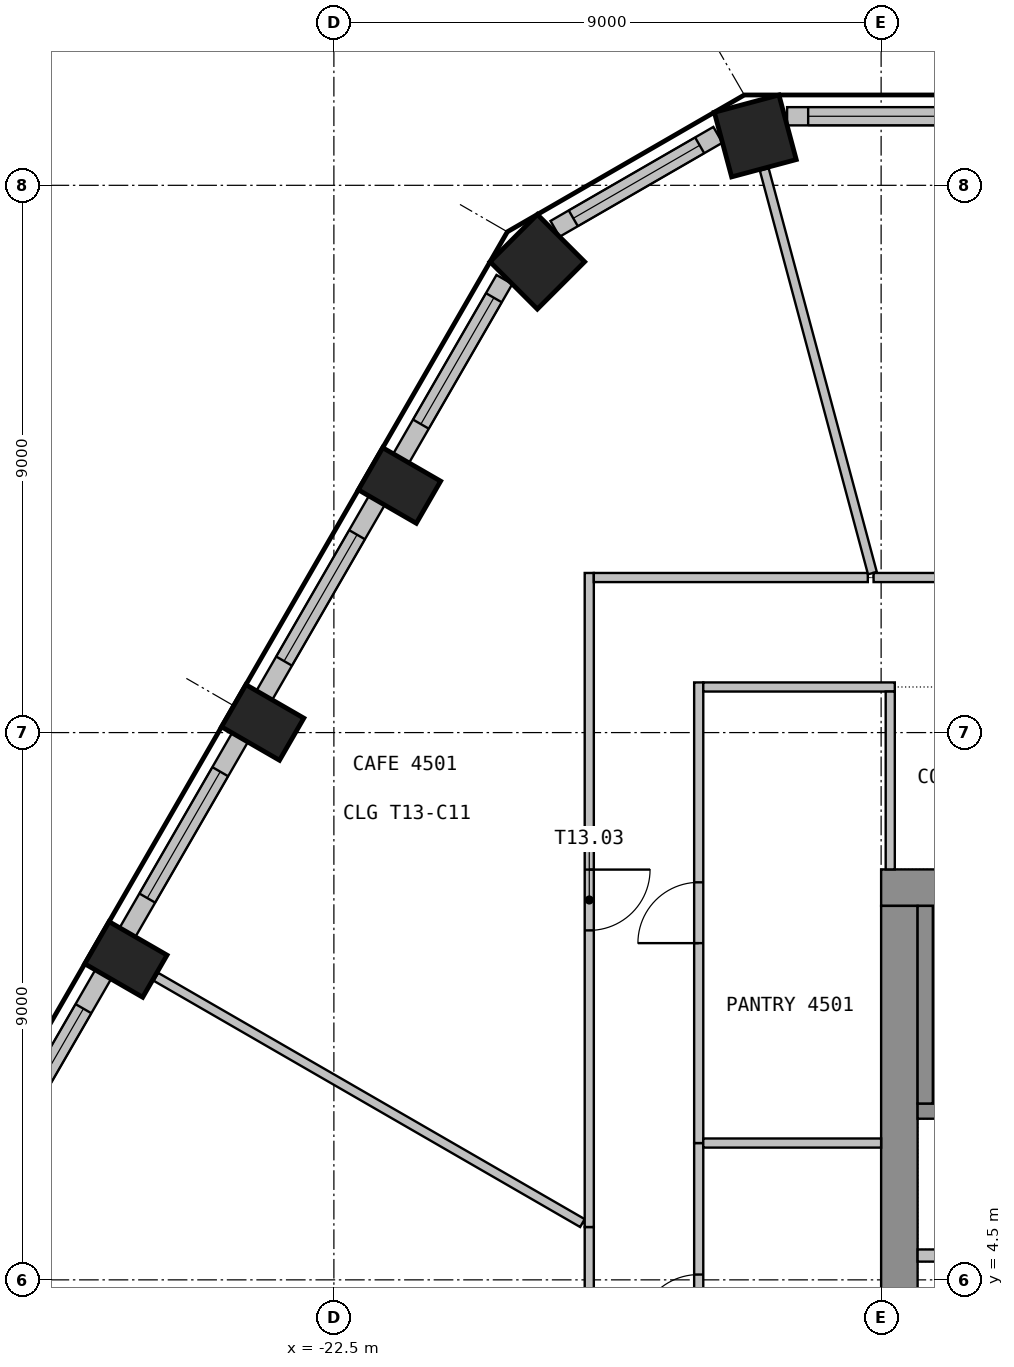
"""IFC4 building model, lengths in metres.
Left out: names, types, materials, properties, quantities, classifications, styles, units other than length and angle.
Written with IfcOpenShell. Run it as: python <this file> out.ifc"""

import sys

from ifc_helpers import new_model, si_unit, direction, frame, frame_2d, origin, origin_2d, place, context, subcontext, project, spatial, rectangle, extrude, element, fill, save


model = new_model("IFC4")
c1 = context("Model", 3, precision=1e-05, world=origin(), true_north=direction((0.0, 1.0)))
c2 = subcontext(c1, "Body", "Model", "MODEL_VIEW")
j1 = project(units=[si_unit("LENGTHUNIT", "METRE"), si_unit("PLANEANGLEUNIT", "RADIAN")], contexts=[c1])
p1 = place(None, origin())
s1 = spatial("IfcSite", under=j1, at=p1, CompositionType="ELEMENT")
p2 = place(p1, origin())
s2 = spatial("IfcBuilding", under=s1, at=p2, CompositionType="ELEMENT")
p3 = place(p2, frame((0.0, 0.0, 183.9)))
s3 = spatial("IfcBuildingStorey", under=s2, at=p3, CompositionType="ELEMENT", Elevation=183.9)
for number, where, z_axis, x_axis in (
    (1, (-15.57, 23.312, 0.0), (0.0, 0.0, 1.0), (-0.966, -0.259, 0.0)),
    (2, (-19.154, 21.242, 0.0), (0.0, 0.0, 1.0), (-0.707, -0.707, 0.0)),
):
    element("IfcColumn", number, at=place(p3, frame(where, z_axis=z_axis, x_axis=x_axis)), inside=s3, PredefinedType="COLUMN", context=c2, shape_type="SweptSolid", body=[
        extrude(rectangle(XDim=1.1, YDim=1.1, at=origin_2d()), origin(), (0.0, 0.0, 1.0), 3.55),
    ])
for number, where, z_axis, x_axis in (
    (3, (-21.421, 17.563, 0.0), (0.0, 0.0, 1.0), (-0.5, -0.866, 0.0)),
    (4, (-23.671, 13.666, 0.0), (0.0, 0.0, 1.0), (-0.5, -0.866, 0.0)),
    (5, (-25.921, 9.769, 0.0), (0.0, 0.0, 1.0), (-0.5, -0.866, 0.0)),
):
    element("IfcColumn", number, at=place(p3, frame(where, z_axis=z_axis, x_axis=x_axis)), inside=s3, PredefinedType="COLUMN", context=c2, shape_type="SweptSolid", body=[
        extrude(rectangle(XDim=0.8, YDim=1.1, at=origin_2d()), origin(), (0.0, 0.0, 1.0), 3.55),
    ])
p4 = place(p3, frame((-11.65, 23.635, 0.0), z_axis=(0.0, 0.0, 1.0), x_axis=(-1.0, 0.0, 0.0)))
e6 = element("IfcWall", 6, at=p4, inside=s3, PredefinedType="SOLIDWALL", context=c2, shape_type="SweptSolid", body=[
    extrude(rectangle(XDim=3.396, YDim=0.3, at=frame_2d((1.698, 0.0))), origin(), (0.0, 0.0, 1.0), 3.55),
])
p5 = place(p4, frame((0.649, 0.0, 0.9)))
e7 = element("IfcOpeningElement", 7, at=p5, cuts=e6, PredefinedType="OPENING", context=c2, shape_type="SweptSolid", body=[
    extrude(rectangle(XDim=2.4, YDim=2.1, at=frame_2d((1.2, 1.05))), frame((0.0, 0.16, 0.0), z_axis=(0.0, -1.0, 0.0), x_axis=(1.0, 0.0, 0.0)), (0.0, 0.0, 1.0), 0.32),
])
p6 = place(p3, frame((-16.184, 23.331, 0.0), z_axis=(0.0, 0.0, 1.0), x_axis=(-0.865994975416, -0.500052699777, 0.0)))
e8 = element("IfcWall", 8, at=p6, inside=s3, PredefinedType="SOLIDWALL", context=c2, shape_type="SweptSolid", body=[
    extrude(rectangle(XDim=3.093, YDim=0.3, at=frame_2d((1.546, 0.0))), origin(), (0.0, 0.0, 1.0), 3.55),
])
p7 = place(p6, frame((0.346, 0.0, 0.9)))
e9 = element("IfcOpeningElement", 9, at=p7, cuts=e8, PredefinedType="OPENING", context=c2, shape_type="SweptSolid", body=[
    extrude(rectangle(XDim=2.4, YDim=2.1, at=frame_2d((1.2, 1.05))), frame((0.0, 0.16, 0.0), z_axis=(0.0, -1.0, 0.0), x_axis=(1.0, 0.0, 0.0)), (0.0, 0.0, 1.0), 0.32),
])
p8 = place(p3, frame((-19.696, 20.951, 0.0), z_axis=(0.0, 0.0, 1.0), x_axis=(-0.500012868213, -0.866017974191, 0.0)))
e10 = element("IfcWall", 10, at=p8, inside=s3, PredefinedType="SOLIDWALL", context=c2, shape_type="SweptSolid", body=[
    extrude(rectangle(XDim=3.396, YDim=0.3, at=frame_2d((1.698, 0.0))), origin(), (0.0, 0.0, 1.0), 3.55),
])
p9 = place(p8, frame((0.346, 0.0, 0.9)))
e11 = element("IfcOpeningElement", 11, at=p9, cuts=e10, PredefinedType="OPENING", context=c2, shape_type="SweptSolid", body=[
    extrude(rectangle(XDim=2.4, YDim=2.1, at=frame_2d((1.2, 1.05))), frame((0.0, 0.16, 0.0), z_axis=(0.0, -1.0, 0.0), x_axis=(1.0, 0.0, 0.0)), (0.0, 0.0, 1.0), 0.32),
])
p10 = place(p3, frame((-21.794, 17.317, 0.0), z_axis=(0.0, 0.0, 1.0), x_axis=(-0.500029062817, -0.866008623709, 0.0)))
e12 = element("IfcWall", 12, at=p10, inside=s3, PredefinedType="SOLIDWALL", context=c2, shape_type="SweptSolid", body=[
    extrude(rectangle(XDim=3.699, YDim=0.3, at=frame_2d((1.85, 0.0))), origin(), (0.0, 0.0, 1.0), 3.55),
])
p11 = place(p10, frame((0.649, 0.0, 0.9)))
e13 = element("IfcOpeningElement", 13, at=p11, cuts=e12, PredefinedType="OPENING", context=c2, shape_type="SweptSolid", body=[
    extrude(rectangle(XDim=2.4, YDim=2.1, at=frame_2d((1.2, 1.05))), frame((0.0, 0.16, 0.0), z_axis=(0.0, -1.0, 0.0), x_axis=(1.0, 0.0, 0.0)), (0.0, 0.0, 1.0), 0.32),
])
p12 = place(p3, frame((-24.044, 13.419, 0.0), z_axis=(0.0, 0.0, 1.0), x_axis=(-0.500029062817, -0.866008623709, 0.0)))
e14 = element("IfcWall", 14, at=p12, inside=s3, PredefinedType="SOLIDWALL", context=c2, shape_type="SweptSolid", body=[
    extrude(rectangle(XDim=3.699, YDim=0.3, at=frame_2d((1.85, 0.0))), origin(), (0.0, 0.0, 1.0), 3.55),
])
p13 = place(p12, frame((0.649, 0.0, 0.9)))
e15 = element("IfcOpeningElement", 15, at=p13, cuts=e14, PredefinedType="OPENING", context=c2, shape_type="SweptSolid", body=[
    extrude(rectangle(XDim=2.4, YDim=2.1, at=frame_2d((1.2, 1.05))), frame((0.0, 0.16, 0.0), z_axis=(0.0, -1.0, 0.0), x_axis=(1.0, 0.0, 0.0)), (0.0, 0.0, 1.0), 0.32),
])
p14 = place(p3, frame((-26.294, 9.522, 0.0), z_axis=(0.0, 0.0, 1.0), x_axis=(-0.500029062817, -0.866008623709, 0.0)))
e16 = element("IfcWall", 16, at=p14, inside=s3, PredefinedType="SOLIDWALL", context=c2, shape_type="SweptSolid", body=[
    extrude(rectangle(XDim=3.699, YDim=0.3, at=frame_2d((1.85, 0.0))), origin(), (0.0, 0.0, 1.0), 3.55),
])
p15 = place(p14, frame((0.649, 0.0, 0.9)))
e17 = element("IfcOpeningElement", 17, at=p15, cuts=e16, PredefinedType="OPENING", context=c2, shape_type="SweptSolid", body=[
    extrude(rectangle(XDim=2.4, YDim=2.1, at=frame_2d((1.2, 1.05))), frame((0.0, 0.16, 0.0), z_axis=(0.0, -1.0, 0.0), x_axis=(1.0, 0.0, 0.0)), (0.0, 0.0, 1.0), 0.32),
])
p16 = place(p3, frame((-13.5, 10.95, 0.0), z_axis=(0.0, 0.0, 1.0), x_axis=(1.0, 0.0, 0.0)))
e18 = element("IfcWall", 18, at=p16, inside=s3, PredefinedType="SHEAR", context=c2, shape_type="SweptSolid", body=[
    extrude(rectangle(XDim=27.0, YDim=0.6, at=frame_2d((13.5, 0.0))), origin(), (0.0, 0.0, 1.0), 3.55),
])
p17 = place(p16, frame((12.3, 0.0, 0.0)))
e19 = element("IfcOpeningElement", 19, at=p17, cuts=e18, PredefinedType="OPENING", context=c2, shape_type="SweptSolid", body=[
    extrude(rectangle(XDim=2.4, YDim=2.1, at=frame_2d((1.2, 1.05))), frame((0.0, 0.31, 0.0), z_axis=(0.0, -1.0, 0.0), x_axis=(1.0, 0.0, 0.0)), (0.0, 0.0, 1.0), 0.62),
])
p18 = place(p16, frame((1.05, 0.0, 0.0)))
e20 = element("IfcOpeningElement", 20, at=p18, cuts=e18, PredefinedType="OPENING", context=c2, shape_type="SweptSolid", body=[
    extrude(rectangle(XDim=1.2, YDim=2.1, at=frame_2d((0.6, 1.05))), frame((0.0, 0.31, 0.0), z_axis=(0.0, -1.0, 0.0), x_axis=(1.0, 0.0, 0.0)), (0.0, 0.0, 1.0), 0.62),
])
p19 = place(p16, frame((24.75, 0.0, 0.0)))
e21 = element("IfcOpeningElement", 21, at=p19, cuts=e18, PredefinedType="OPENING", context=c2, shape_type="SweptSolid", body=[
    extrude(rectangle(XDim=1.2, YDim=2.1, at=frame_2d((0.6, 1.05))), frame((0.0, 0.31, 0.0), z_axis=(0.0, -1.0, 0.0), x_axis=(1.0, 0.0, 0.0)), (0.0, 0.0, 1.0), 0.62),
])
p20 = place(p3, frame((-13.2, -10.65, 0.0), z_axis=(0.0, 0.0, 1.0), x_axis=(0.0, 1.0, 0.0)))
e22 = element("IfcWall", 22, at=p20, inside=s3, PredefinedType="SHEAR", context=c2, shape_type="SweptSolid", body=[
    extrude(rectangle(XDim=21.3, YDim=0.6, at=frame_2d((10.65, 0.0))), origin(), (0.0, 0.0, 1.0), 3.55),
])
p21 = place(p20, frame((9.45, 0.0, 0.0)))
e23 = element("IfcOpeningElement", 23, at=p21, cuts=e22, PredefinedType="OPENING", context=c2, shape_type="SweptSolid", body=[
    extrude(rectangle(XDim=2.4, YDim=2.1, at=frame_2d((1.2, 1.05))), frame((0.0, 0.31, 0.0), z_axis=(0.0, -1.0, 0.0), x_axis=(1.0, 0.0, 0.0)), (0.0, 0.0, 1.0), 0.62),
])
p22 = place(p3, frame((-12.9, 7.275, 0.0), z_axis=(0.0, 0.0, 1.0), x_axis=(1.0, 0.0, 0.0)))
e24 = element("IfcWall", 24, at=p22, inside=s3, PredefinedType="SHEAR", context=c2, shape_type="SweptSolid", body=[
    extrude(rectangle(XDim=10.1, YDim=0.25, at=frame_2d((5.05, 0.0))), origin(), (0.0, 0.0, 1.0), 3.55),
])
p23 = place(p22, frame((0.45, 0.0, 0.0)))
e25 = element("IfcOpeningElement", 25, at=p23, cuts=e24, PredefinedType="OPENING", context=c2, shape_type="SweptSolid", body=[
    extrude(rectangle(XDim=1.2, YDim=2.1, at=frame_2d((0.6, 1.05))), frame((0.0, 0.135, 0.0), z_axis=(0.0, -1.0, 0.0), x_axis=(1.0, 0.0, 0.0)), (0.0, 0.0, 1.0), 0.27),
])
p24 = place(p3, frame((-12.775, 7.4, 0.0), z_axis=(0.0, 0.0, 1.0), x_axis=(0.0, 1.0, 0.0)))
e26 = element("IfcWall", 26, at=p24, inside=s3, PredefinedType="SHEAR", context=c2, shape_type="SweptSolid", body=[
    extrude(rectangle(XDim=3.25, YDim=0.25, at=frame_2d((1.625, 0.0))), origin(), (0.0, 0.0, 1.0), 3.55),
])
p25 = place(p3, frame((-12.9, 4.9, 0.0), z_axis=(0.0, 0.0, 1.0), x_axis=(1.0, 0.0, 0.0)))
e27 = element("IfcWall", 27, at=p25, inside=s3, PredefinedType="PARTITIONING", context=c2, shape_type="SweptSolid", body=[
    extrude(rectangle(XDim=11.375, YDim=0.2, at=frame_2d((5.688, 0.0))), origin(), (0.0, 0.0, 1.0), 3.55),
])
p26 = place(p3, frame((-25.427, 9.484, 0.0), z_axis=(0.0, 0.0, 1.0), x_axis=(0.866017937352, -0.500012932018, 0.0)))
e28 = element("IfcWall", 28, at=p26, inside=s3, PredefinedType="PARTITIONING", context=c2, shape_type="SweptSolid", body=[
    extrude(rectangle(XDim=8.1, YDim=0.15, at=frame_2d((4.05, 0.0))), origin(), (0.0, 0.0, 1.0), 3.55),
])
p27 = place(p3, frame((-18.3, 5.369, 0.0), z_axis=(0.0, 0.0, 1.0), x_axis=(0.0, -1.0, 0.0)))
e29 = element("IfcWall", 29, at=p27, inside=s3, PredefinedType="PARTITIONING", context=c2, shape_type="SweptSolid", body=[
    extrude(rectangle(XDim=5.542, YDim=0.15, at=frame_2d((2.771, 0.0))), origin(), (0.0, 0.0, 1.0), 3.55),
])
p28 = place(p27, frame((2.271, 0.0, 0.0)))
e30 = element("IfcOpeningElement", 30, at=p28, cuts=e29, PredefinedType="OPENING", context=c2, shape_type="SweptSolid", body=[
    extrude(rectangle(XDim=1.0, YDim=2.1, at=frame_2d((0.5, 1.05))), frame((0.0, 0.085, 0.0), z_axis=(0.0, -1.0, 0.0), x_axis=(1.0, 0.0, 0.0)), (0.0, 0.0, 1.0), 0.17),
])
p29 = place(p3, frame((-18.3, 16.125, 0.0), z_axis=(0.0, 0.0, 1.0), x_axis=(0.0, -1.0, 0.0)))
e31 = element("IfcWall", 31, at=p29, inside=s3, PredefinedType="PARTITIONING", context=c2, shape_type="SweptSolid", body=[
    extrude(rectangle(XDim=10.756, YDim=0.15, at=frame_2d((5.378, 0.0))), origin(), (0.0, 0.0, 1.0), 3.55),
])
p30 = place(p29, frame((4.878, 0.0, 0.0)))
e32 = element("IfcOpeningElement", 32, at=p30, cuts=e31, PredefinedType="OPENING", context=c2, shape_type="SweptSolid", body=[
    extrude(rectangle(XDim=1.0, YDim=2.1, at=frame_2d((0.5, 1.05))), frame((0.0, 0.085, 0.0), z_axis=(0.0, -1.0, 0.0), x_axis=(1.0, 0.0, 0.0)), (0.0, 0.0, 1.0), 0.17),
])
p31 = place(p3, frame((-13.719, 16.05, 0.0), z_axis=(0.0, 0.0, 1.0), x_axis=(-1.0, 0.0, 0.0)))
e33 = element("IfcWall", 33, at=p31, inside=s3, PredefinedType="PARTITIONING", context=c2, shape_type="SweptSolid", body=[
    extrude(rectangle(XDim=4.506, YDim=0.15, at=frame_2d((2.253, 0.0))), origin(), (0.0, 0.0, 1.0), 3.55),
])
p32 = place(p3, frame((-16.5, 1.425, 0.0), z_axis=(0.0, 0.0, 1.0), x_axis=(0.0, 1.0, 0.0)))
e34 = element("IfcWall", 34, at=p32, inside=s3, PredefinedType="PARTITIONING", context=c2, shape_type="SweptSolid", body=[
    extrude(rectangle(XDim=5.325, YDim=0.15, at=frame_2d((2.663, 0.0))), origin(), (0.0, 0.0, 1.0), 3.55),
])
p33 = place(p32, frame((2.163, 0.0, 0.0)))
e35 = element("IfcOpeningElement", 35, at=p33, cuts=e34, PredefinedType="OPENING", context=c2, shape_type="SweptSolid", body=[
    extrude(rectangle(XDim=1.0, YDim=2.1, at=frame_2d((0.5, 1.05))), frame((0.0, 0.085, 0.0), z_axis=(0.0, -1.0, 0.0), x_axis=(1.0, 0.0, 0.0)), (0.0, 0.0, 1.0), 0.17),
])
p34 = place(p3, frame((-16.5, 6.75, 0.0), z_axis=(0.0, 0.0, 1.0), x_axis=(0.0, 1.0, 0.0)))
e36 = element("IfcWall", 36, at=p34, inside=s3, PredefinedType="PARTITIONING", context=c2, shape_type="SweptSolid", body=[
    extrude(rectangle(XDim=7.575, YDim=0.15, at=frame_2d((3.788, 0.0))), origin(), (0.0, 0.0, 1.0), 3.55),
])
p35 = place(p34, frame((3.288, 0.0, 0.0)))
e37 = element("IfcOpeningElement", 37, at=p35, cuts=e36, PredefinedType="OPENING", context=c2, shape_type="SweptSolid", body=[
    extrude(rectangle(XDim=1.0, YDim=2.1, at=frame_2d((0.5, 1.05))), frame((0.0, 0.085, 0.0), z_axis=(0.0, -1.0, 0.0), x_axis=(1.0, 0.0, 0.0)), (0.0, 0.0, 1.0), 0.17),
])
p36 = place(p3, frame((-16.425, 6.75, 0.0), z_axis=(0.0, 0.0, 1.0), x_axis=(1.0, 0.0, 0.0)))
e38 = element("IfcWall", 38, at=p36, inside=s3, PredefinedType="PARTITIONING", context=c2, shape_type="SweptSolid", body=[
    extrude(rectangle(XDim=2.925, YDim=0.15, at=frame_2d((1.462, 0.0))), origin(), (0.0, 0.0, 1.0), 3.55),
])
p37 = place(p3, frame((-16.425, 14.25, 0.0), z_axis=(0.0, 0.0, 1.0), x_axis=(1.0, 0.0, 0.0)))
e39 = element("IfcWall", 39, at=p37, inside=s3, PredefinedType="PARTITIONING", context=c2, shape_type="SweptSolid", body=[
    extrude(rectangle(XDim=3.15, YDim=0.15, at=frame_2d((1.575, 0.0))), origin(), (0.0, 0.0, 1.0), 3.55),
])
p38 = place(p3, frame((-15.422, 22.761, 0.0), z_axis=(0.0, 0.0, 1.0), x_axis=(0.258807697684, -0.965928866749, 0.0)))
e40 = element("IfcWall", 40, at=p38, inside=s3, PredefinedType="PARTITIONING", context=c2, shape_type="SweptSolid", body=[
    extrude(rectangle(XDim=6.873, YDim=0.15, at=frame_2d((3.437, 0.0))), origin(), (0.0, 0.0, 1.0), 3.55),
])
p39 = place(p3, frame((-6.75, 16.05, 0.0), z_axis=(0.0, 0.0, 1.0), x_axis=(-1.0, 0.0, 0.0)))
e41 = element("IfcWall", 41, at=p39, inside=s3, PredefinedType="PARTITIONING", context=c2, shape_type="SweptSolid", body=[
    extrude(rectangle(XDim=6.874, YDim=0.15, at=frame_2d((3.437, 0.0))), origin(), (0.0, 0.0, 1.0), 3.55),
])
p40 = place(p39, frame((2.937, 0.0, 0.0)))
e42 = element("IfcOpeningElement", 42, at=p40, cuts=e41, PredefinedType="OPENING", context=c2, shape_type="SweptSolid", body=[
    extrude(rectangle(XDim=1.0, YDim=2.1, at=frame_2d((0.5, 1.05))), frame((0.0, 0.085, 0.0), z_axis=(0.0, -1.0, 0.0), x_axis=(1.0, 0.0, 0.0)), (0.0, 0.0, 1.0), 0.17),
])
p41 = place(p3, frame((-13.35, 14.175, 0.0), z_axis=(0.0, 0.0, 1.0), x_axis=(0.0, -1.0, 0.0)))
e43 = element("IfcWall", 43, at=p41, inside=s3, PredefinedType="PARTITIONING", context=c2, shape_type="SweptSolid", body=[
    extrude(rectangle(XDim=2.925, YDim=0.15, at=frame_2d((1.462, 0.0))), origin(), (0.0, 0.0, 1.0), 3.55),
])
p42 = place(p5, origin())
e44 = element("IfcWindow", 44, at=p42, inside=s3, PartitioningType="SINGLE_PANEL", PredefinedType="WINDOW", context=c2, shape_type="SweptSolid", body=[
    extrude(rectangle(XDim=2.4, YDim=2.1, at=frame_2d((1.2, 1.05))), frame((0.0, 0.03, 0.0), z_axis=(0.0, -1.0, 0.0), x_axis=(1.0, 0.0, 0.0)), (0.0, 0.0, 1.0), 0.06),
])
fill(e7, e44)
p43 = place(p7, origin())
e45 = element("IfcWindow", 45, at=p43, inside=s3, PartitioningType="SINGLE_PANEL", PredefinedType="WINDOW", context=c2, shape_type="SweptSolid", body=[
    extrude(rectangle(XDim=2.4, YDim=2.1, at=frame_2d((1.2, 1.05))), frame((0.0, 0.03, 0.0), z_axis=(0.0, -1.0, 0.0), x_axis=(1.0, 0.0, 0.0)), (0.0, 0.0, 1.0), 0.06),
])
fill(e9, e45)
p44 = place(p9, origin())
e46 = element("IfcWindow", 46, at=p44, inside=s3, PartitioningType="SINGLE_PANEL", PredefinedType="WINDOW", context=c2, shape_type="SweptSolid", body=[
    extrude(rectangle(XDim=2.4, YDim=2.1, at=frame_2d((1.2, 1.05))), frame((0.0, 0.03, 0.0), z_axis=(0.0, -1.0, 0.0), x_axis=(1.0, 0.0, 0.0)), (0.0, 0.0, 1.0), 0.06),
])
fill(e11, e46)
p45 = place(p11, origin())
e47 = element("IfcWindow", 47, at=p45, inside=s3, PartitioningType="SINGLE_PANEL", PredefinedType="WINDOW", context=c2, shape_type="SweptSolid", body=[
    extrude(rectangle(XDim=2.4, YDim=2.1, at=frame_2d((1.2, 1.05))), frame((0.0, 0.03, 0.0), z_axis=(0.0, -1.0, 0.0), x_axis=(1.0, 0.0, 0.0)), (0.0, 0.0, 1.0), 0.06),
])
fill(e13, e47)
p46 = place(p13, origin())
e48 = element("IfcWindow", 48, at=p46, inside=s3, PartitioningType="SINGLE_PANEL", PredefinedType="WINDOW", context=c2, shape_type="SweptSolid", body=[
    extrude(rectangle(XDim=2.4, YDim=2.1, at=frame_2d((1.2, 1.05))), frame((0.0, 0.03, 0.0), z_axis=(0.0, -1.0, 0.0), x_axis=(1.0, 0.0, 0.0)), (0.0, 0.0, 1.0), 0.06),
])
fill(e15, e48)
p47 = place(p15, origin())
e49 = element("IfcWindow", 49, at=p47, inside=s3, PartitioningType="SINGLE_PANEL", PredefinedType="WINDOW", context=c2, shape_type="SweptSolid", body=[
    extrude(rectangle(XDim=2.4, YDim=2.1, at=frame_2d((1.2, 1.05))), frame((0.0, 0.03, 0.0), z_axis=(0.0, -1.0, 0.0), x_axis=(1.0, 0.0, 0.0)), (0.0, 0.0, 1.0), 0.06),
])
fill(e17, e49)
p48 = place(p30, origin())
e50 = element("IfcDoor", 50, at=p48, inside=s3, OperationType="SINGLE_SWING_LEFT", PredefinedType="DOOR", context=c2, shape_type="SweptSolid", body=[
    extrude(rectangle(XDim=1.0, YDim=2.1, at=frame_2d((0.5, 1.05))), frame((0.0, 0.025, 0.0), z_axis=(0.0, -1.0, 0.0), x_axis=(1.0, 0.0, 0.0)), (0.0, 0.0, 1.0), 0.05),
])
fill(e32, e50)
p49 = place(p33, origin())
e51 = element("IfcDoor", 51, at=p49, inside=s3, OperationType="SINGLE_SWING_RIGHT", PredefinedType="DOOR", context=c2, shape_type="SweptSolid", body=[
    extrude(rectangle(XDim=1.0, YDim=2.1, at=frame_2d((0.5, 1.05))), frame((0.0, 0.025, 0.0), z_axis=(0.0, -1.0, 0.0), x_axis=(1.0, 0.0, 0.0)), (0.0, 0.0, 1.0), 0.05),
])
fill(e35, e51)
p50 = place(p35, origin())
e52 = element("IfcDoor", 52, at=p50, inside=s3, OperationType="SINGLE_SWING_RIGHT", PredefinedType="DOOR", context=c2, shape_type="SweptSolid", body=[
    extrude(rectangle(XDim=1.0, YDim=2.1, at=frame_2d((0.5, 1.05))), frame((0.0, 0.025, 0.0), z_axis=(0.0, -1.0, 0.0), x_axis=(1.0, 0.0, 0.0)), (0.0, 0.0, 1.0), 0.05),
])
fill(e37, e52)
save(model, sys.argv[1])
